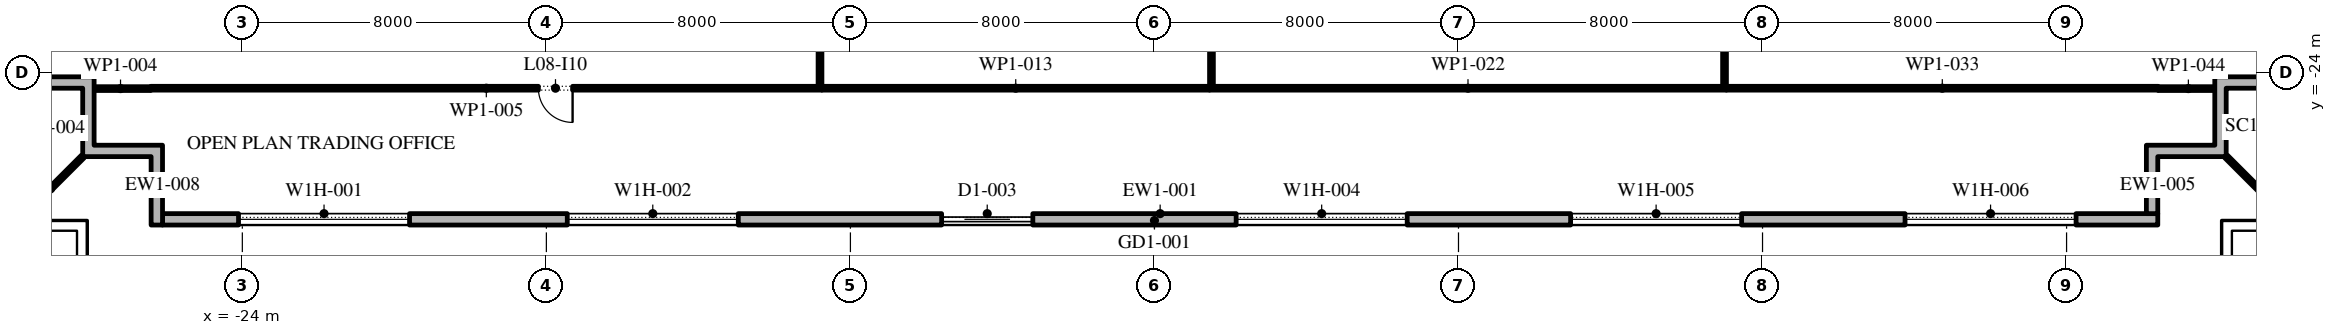
"""IFC4 building model, lengths in metres.
Left out: names, types, materials, properties, quantities, classifications, styles, units other than length and angle.
Written with IfcOpenShell. Run it as: python <this file> out.ifc"""

import sys

from ifc_helpers import new_model, si_unit, direction, frame, frame_2d, origin, place, context, subcontext, project, spatial, polyline, rectangle, outline, extrude, element, fill, save


model = new_model("IFC4")
c1 = context("Model", 3, precision=1e-05, world=origin(), true_north=direction((0.0, 1.0)))
c2 = subcontext(c1, "Body", "Model", "MODEL_VIEW")
j1 = project(units=[si_unit("LENGTHUNIT", "METRE"), si_unit("PLANEANGLEUNIT", "RADIAN")], contexts=[c1])
p1 = place(None, origin())
s1 = spatial("IfcSite", under=j1, at=p1, CompositionType="ELEMENT")
p2 = place(p1, origin())
s2 = spatial("IfcBuilding", under=s1, at=p2, CompositionType="ELEMENT")
p3 = place(p2, frame((0.0, 0.0, 43.8)))
s3 = spatial("IfcBuildingStorey", under=s2, at=p3, CompositionType="ELEMENT", Elevation=43.8)
p4 = place(p3, frame((-26.1, -27.85, 0.0), z_axis=(0.0, 0.0, 1.0), x_axis=(1.0, 0.0, 0.0)))
e1 = element("IfcWall", 1, at=p4, inside=s3, PredefinedType="STANDARD", context=c2, shape_type="SweptSolid", body=[
    extrude(rectangle(XDim=52.5, YDim=0.3, at=frame_2d((26.25, 0.0))), origin(), (0.0, 0.0, 1.0), 4.0),
])
p5 = place(p4, frame((2.0, 0.0, 0.45)))
e2 = element("IfcOpeningElement", 2, at=p5, cuts=e1, PredefinedType="OPENING", context=c2, shape_type="SweptSolid", body=[
    extrude(rectangle(XDim=4.5, YDim=2.75, at=frame_2d((2.25, 1.375))), frame((0.0, 0.16, 0.0), z_axis=(0.0, -1.0, 0.0), x_axis=(1.0, 0.0, 0.0)), (0.0, 0.0, 1.0), 0.32),
])
p6 = place(p4, frame((10.65, 0.0, 0.45)))
e3 = element("IfcOpeningElement", 3, at=p6, cuts=e1, PredefinedType="OPENING", context=c2, shape_type="SweptSolid", body=[
    extrude(rectangle(XDim=4.5, YDim=2.75, at=frame_2d((2.25, 1.375))), frame((0.0, 0.16, 0.0), z_axis=(0.0, -1.0, 0.0), x_axis=(1.0, 0.0, 0.0)), (0.0, 0.0, 1.0), 0.32),
])
p7 = place(p4, frame((20.5, 0.0, 0.0)))
e4 = element("IfcOpeningElement", 4, at=p7, cuts=e1, PredefinedType="OPENING", context=c2, shape_type="SweptSolid", body=[
    extrude(rectangle(XDim=2.4, YDim=3.5, at=frame_2d((1.2, 1.75))), frame((0.0, 0.16, 0.0), z_axis=(0.0, -1.0, 0.0), x_axis=(1.0, 0.0, 0.0)), (0.0, 0.0, 1.0), 0.32),
])
p8 = place(p4, frame((28.25, 0.0, 0.45)))
e5 = element("IfcOpeningElement", 5, at=p8, cuts=e1, PredefinedType="OPENING", context=c2, shape_type="SweptSolid", body=[
    extrude(rectangle(XDim=4.5, YDim=2.75, at=frame_2d((2.25, 1.375))), frame((0.0, 0.16, 0.0), z_axis=(0.0, -1.0, 0.0), x_axis=(1.0, 0.0, 0.0)), (0.0, 0.0, 1.0), 0.32),
])
p9 = place(p4, frame((37.05, 0.0, 0.45)))
e6 = element("IfcOpeningElement", 6, at=p9, cuts=e1, PredefinedType="OPENING", context=c2, shape_type="SweptSolid", body=[
    extrude(rectangle(XDim=4.5, YDim=2.75, at=frame_2d((2.25, 1.375))), frame((0.0, 0.16, 0.0), z_axis=(0.0, -1.0, 0.0), x_axis=(1.0, 0.0, 0.0)), (0.0, 0.0, 1.0), 0.32),
])
p10 = place(p4, frame((45.85, 0.0, 0.45)))
e7 = element("IfcOpeningElement", 7, at=p10, cuts=e1, PredefinedType="OPENING", context=c2, shape_type="SweptSolid", body=[
    extrude(rectangle(XDim=4.5, YDim=2.75, at=frame_2d((2.25, 1.375))), frame((0.0, 0.16, 0.0), z_axis=(0.0, -1.0, 0.0), x_axis=(1.0, 0.0, 0.0)), (0.0, 0.0, 1.0), 0.32),
])
p11 = place(p3, origin())
e8 = element("IfcWall", 8, at=p11, inside=s3, PredefinedType="STANDARD", context=c2, shape_type="SweptSolid", body=[
    extrude(outline(polyline([(27.9, -25.9), (27.9, -24.1), (30.0, -24.1), (30.0, -24.4), (28.2, -24.4), (28.2, -26.2), (26.4, -26.2), (26.4, -27.7), (26.1, -27.7), (26.1, -25.9), (27.9, -25.9)])), origin(), (0.0, 0.0, 1.0), 4.0),
])
p12 = place(p3, origin())
e9 = element("IfcWall", 9, at=p12, inside=s3, PredefinedType="STANDARD", context=c2, shape_type="SweptSolid", body=[
    extrude(outline(polyline([(-26.4, -26.2), (-28.2, -26.2), (-28.2, -24.4), (-29.7, -24.4), (-29.7, -24.1), (-27.9, -24.1), (-27.9, -25.9), (-26.1, -25.9), (-26.1, -28.0), (-26.4, -28.0), (-26.4, -26.2)])), origin(), (0.0, 0.0, 1.0), 4.0),
])
for number, where, z_axis, x_axis in (
    (10, (28.2, -26.2, -0.05), (0.0, 0.0, 1.0), (0.707, -0.707, 0.0)),
    (11, (-28.2, -26.2, -0.05), (0.0, 0.0, 1.0), (-0.707, -0.707, 0.0)),
):
    element("IfcWall", number, at=place(p3, frame(where, z_axis=z_axis, x_axis=x_axis)), inside=s3, PredefinedType="STANDARD", context=c2, shape_type="SweptSolid", body=[
        extrude(rectangle(XDim=2.385, YDim=0.1, at=frame_2d((1.192, 0.0))), origin(), (0.0, 0.0, 1.0), 4.05),
    ])
p13 = place(p3, frame((-28.0, -24.41, 0.0), z_axis=(0.0, 0.0, 1.0), x_axis=(1.0, 0.0, 0.0)))
e12 = element("IfcWall", 12, at=p13, inside=s3, PredefinedType="PARTITIONING", context=c2, shape_type="SweptSolid", body=[
    extrude(rectangle(XDim=1.59, YDim=0.1, at=frame_2d((0.795, 0.0))), origin(), (0.0, 0.0, 1.0), 4.0),
])
p14 = place(p3, frame((-26.41, -24.4, 0.0), z_axis=(0.0, 0.0, 1.0), x_axis=(1.0, 0.0, 0.0)))
e13 = element("IfcWall", 13, at=p14, inside=s3, PredefinedType="PARTITIONING", context=c2, shape_type="SweptSolid", body=[
    extrude(rectangle(XDim=17.66, YDim=0.1, at=frame_2d((8.83, 0.0))), origin(), (0.0, 0.0, 1.0), 4.0),
])
p15 = place(p14, frame((10.2, 0.0, 0.0)))
e14 = element("IfcOpeningElement", 14, at=p15, cuts=e13, PredefinedType="OPENING", context=c2, shape_type="SweptSolid", body=[
    extrude(rectangle(XDim=0.9, YDim=2.1, at=frame_2d((0.45, 1.05))), frame((0.0, 0.06, 0.0), z_axis=(0.0, -1.0, 0.0), x_axis=(1.0, 0.0, 0.0)), (0.0, 0.0, 1.0), 0.12),
])
p16 = place(p3, frame((-8.75, -24.4, 0.0), z_axis=(0.0, 0.0, 1.0), x_axis=(1.0, 0.0, 0.0)))
e15 = element("IfcWall", 15, at=p16, inside=s3, PredefinedType="PARTITIONING", context=c2, shape_type="SweptSolid", body=[
    extrude(rectangle(XDim=10.2, YDim=0.1, at=frame_2d((5.1, 0.0))), origin(), (0.0, 0.0, 1.0), 4.0),
])
p17 = place(p3, frame((-8.8, -17.675, 0.0), z_axis=(0.0, 0.0, 1.0), x_axis=(0.0, -1.0, 0.0)))
e16 = element("IfcWall", 16, at=p17, inside=s3, PredefinedType="PARTITIONING", context=c2, shape_type="SweptSolid", body=[
    extrude(rectangle(XDim=6.675, YDim=0.1, at=frame_2d((3.337, 0.0))), origin(), (0.0, 0.0, 1.0), 4.0),
])
p18 = place(p3, frame((1.45, -24.4, 0.0), z_axis=(0.0, 0.0, 1.0), x_axis=(1.0, 0.0, 0.0)))
e17 = element("IfcWall", 17, at=p18, inside=s3, PredefinedType="PARTITIONING", context=c2, shape_type="SweptSolid", body=[
    extrude(rectangle(XDim=13.6, YDim=0.1, at=frame_2d((6.8, 0.0))), origin(), (0.0, 0.0, 1.0), 4.0),
])
p19 = place(p3, frame((1.5, -17.34, 0.0), z_axis=(0.0, 0.0, 1.0), x_axis=(0.0, -1.0, 0.0)))
e18 = element("IfcWall", 18, at=p19, inside=s3, PredefinedType="PARTITIONING", context=c2, shape_type="SweptSolid", body=[
    extrude(rectangle(XDim=7.01, YDim=0.1, at=frame_2d((3.505, 0.0))), origin(), (0.0, 0.0, 1.0), 4.0),
])
p20 = place(p3, frame((15.05, -24.4, 0.0), z_axis=(0.0, 0.0, 1.0), x_axis=(1.0, 0.0, 0.0)))
e19 = element("IfcWall", 19, at=p20, inside=s3, PredefinedType="PARTITIONING", context=c2, shape_type="SweptSolid", body=[
    extrude(rectangle(XDim=11.36, YDim=0.1, at=frame_2d((5.68, 0.0))), origin(), (0.0, 0.0, 1.0), 4.0),
])
p21 = place(p3, frame((15.0, -17.675, 0.0), z_axis=(0.0, 0.0, 1.0), x_axis=(0.0, -1.0, 0.0)))
e20 = element("IfcWall", 20, at=p21, inside=s3, PredefinedType="PARTITIONING", context=c2, shape_type="SweptSolid", body=[
    extrude(rectangle(XDim=6.675, YDim=0.1, at=frame_2d((3.337, 0.0))), origin(), (0.0, 0.0, 1.0), 4.0),
])
p22 = place(p3, frame((26.41, -24.41, 0.0), z_axis=(0.0, 0.0, 1.0), x_axis=(1.0, 0.0, 0.0)))
e21 = element("IfcWall", 21, at=p22, inside=s3, PredefinedType="PARTITIONING", context=c2, shape_type="SweptSolid", body=[
    extrude(rectangle(XDim=1.59, YDim=0.1, at=frame_2d((0.795, 0.0))), origin(), (0.0, 0.0, 1.0), 4.0),
])
p23 = place(p5, origin())
e22 = element("IfcWindow", 22, at=p23, inside=s3, PartitioningType="DOUBLE_PANEL_VERTICAL", PredefinedType="WINDOW", context=c2, shape_type="SweptSolid", body=[
    extrude(rectangle(XDim=4.5, YDim=2.75, at=frame_2d((2.25, 1.375))), frame((0.0, 0.03, 0.0), z_axis=(0.0, -1.0, 0.0), x_axis=(1.0, 0.0, 0.0)), (0.0, 0.0, 1.0), 0.06),
])
fill(e2, e22)
p24 = place(p6, origin())
e23 = element("IfcWindow", 23, at=p24, inside=s3, PartitioningType="DOUBLE_PANEL_VERTICAL", PredefinedType="WINDOW", context=c2, shape_type="SweptSolid", body=[
    extrude(rectangle(XDim=4.5, YDim=2.75, at=frame_2d((2.25, 1.375))), frame((0.0, 0.03, 0.0), z_axis=(0.0, -1.0, 0.0), x_axis=(1.0, 0.0, 0.0)), (0.0, 0.0, 1.0), 0.06),
])
fill(e3, e23)
p25 = place(p7, origin())
e24 = element("IfcDoor", 24, at=p25, inside=s3, OperationType="DOUBLE_DOOR_SLIDING", PredefinedType="DOOR", context=c2, shape_type="SweptSolid", body=[
    extrude(rectangle(XDim=2.4, YDim=3.5, at=frame_2d((1.2, 1.75))), frame((0.0, 0.025, 0.0), z_axis=(0.0, -1.0, 0.0), x_axis=(1.0, 0.0, 0.0)), (0.0, 0.0, 1.0), 0.05),
])
fill(e4, e24)
p26 = place(p8, origin())
e25 = element("IfcWindow", 25, at=p26, inside=s3, PartitioningType="DOUBLE_PANEL_VERTICAL", PredefinedType="WINDOW", context=c2, shape_type="SweptSolid", body=[
    extrude(rectangle(XDim=4.5, YDim=2.75, at=frame_2d((2.25, 1.375))), frame((0.0, 0.03, 0.0), z_axis=(0.0, -1.0, 0.0), x_axis=(1.0, 0.0, 0.0)), (0.0, 0.0, 1.0), 0.06),
])
fill(e5, e25)
p27 = place(p9, origin())
e26 = element("IfcWindow", 26, at=p27, inside=s3, PartitioningType="DOUBLE_PANEL_VERTICAL", PredefinedType="WINDOW", context=c2, shape_type="SweptSolid", body=[
    extrude(rectangle(XDim=4.5, YDim=2.75, at=frame_2d((2.25, 1.375))), frame((0.0, 0.03, 0.0), z_axis=(0.0, -1.0, 0.0), x_axis=(1.0, 0.0, 0.0)), (0.0, 0.0, 1.0), 0.06),
])
fill(e6, e26)
p28 = place(p10, origin())
e27 = element("IfcWindow", 27, at=p28, inside=s3, PartitioningType="DOUBLE_PANEL_VERTICAL", PredefinedType="WINDOW", context=c2, shape_type="SweptSolid", body=[
    extrude(rectangle(XDim=4.5, YDim=2.75, at=frame_2d((2.25, 1.375))), frame((0.0, 0.03, 0.0), z_axis=(0.0, -1.0, 0.0), x_axis=(1.0, 0.0, 0.0)), (0.0, 0.0, 1.0), 0.06),
])
fill(e7, e27)
p29 = place(p15, frame((0.9, 0.0, 0.0), z_axis=(0.0, 0.0, 1.0), x_axis=(-1.0, 0.0, 0.0)))
e28 = element("IfcDoor", 28, at=p29, inside=s3, OperationType="SINGLE_SWING_RIGHT", PredefinedType="DOOR", context=c2, shape_type="SweptSolid", body=[
    extrude(rectangle(XDim=0.9, YDim=2.1, at=frame_2d((0.45, 1.05))), frame((0.0, 0.025, 0.0), z_axis=(0.0, -1.0, 0.0), x_axis=(1.0, 0.0, 0.0)), (0.0, 0.0, 1.0), 0.05),
])
fill(e14, e28)
save(model, sys.argv[1])
